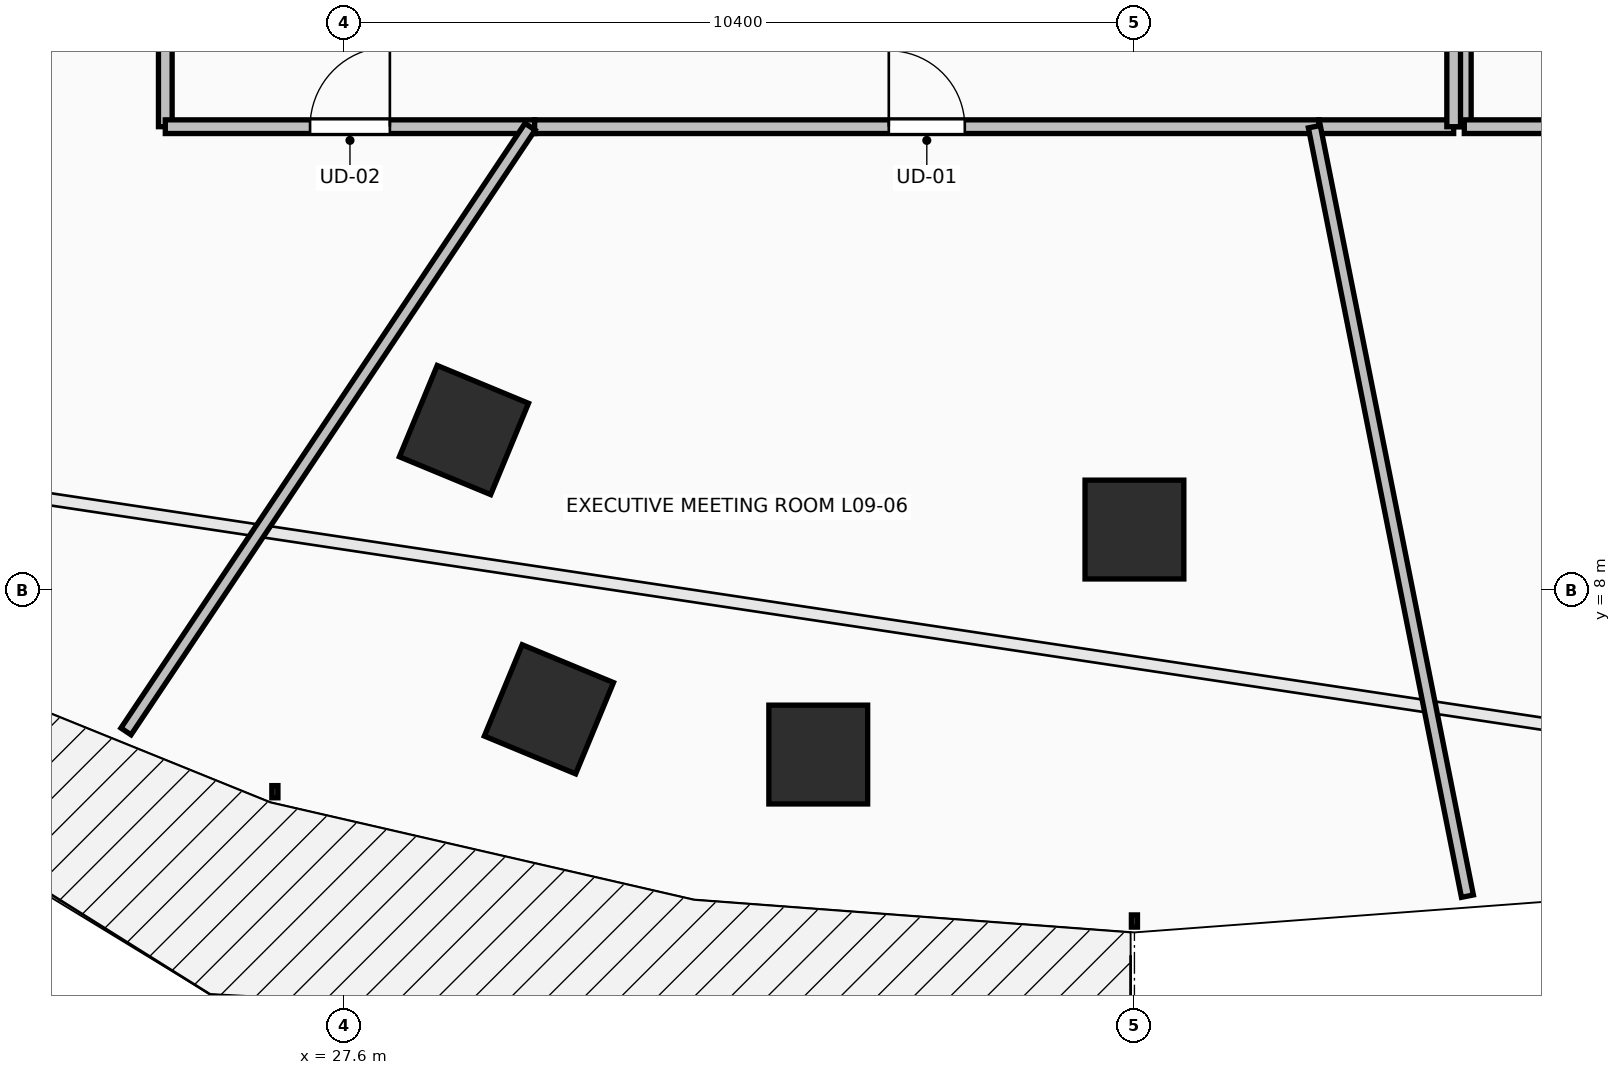
"""IFC4 building model, lengths in metres.
Left out: names, types, materials, properties, quantities, classifications, styles, units other than length and angle.
Written with IfcOpenShell. Run it as: python <this file> out.ifc"""

import sys

from ifc_helpers import new_model, si_unit, direction, frame, frame_2d, origin, origin_2d, place, context, subcontext, project, spatial, rectangle, extrude, element, fill, save


model = new_model("IFC4")
c1 = context("Model", 3, precision=1e-05, world=origin(), true_north=direction((0.0, 1.0)))
c2 = subcontext(c1, "Body", "Model", "MODEL_VIEW")
j1 = project(units=[si_unit("LENGTHUNIT", "METRE"), si_unit("PLANEANGLEUNIT", "RADIAN")], contexts=[c1])
p1 = place(None, origin())
s1 = spatial("IfcSite", under=j1, at=p1, CompositionType="ELEMENT")
p2 = place(p1, origin())
s2 = spatial("IfcBuilding", under=s1, at=p2, CompositionType="ELEMENT")
p3 = place(p2, frame((0.0, 0.0, 38.0)))
s3 = spatial("IfcBuildingStorey", under=s2, at=p3, CompositionType="ELEMENT", Elevation=38.0)
for number, where, z_axis, x_axis in (
    (1, (29.179, 10.109, 0.0), (0.0, 0.0, 1.0), (-0.383, -0.924, 0.0)),
    (2, (38.0, 8.8, 0.0), (0.0, 0.0, 1.0), (0.0, -1.0, 0.0)),
    (3, (30.297, 6.435, 0.0), (0.0, 0.0, 1.0), (-0.383, -0.924, 0.0)),
    (4, (33.84, 5.84, 0.0), (0.0, 0.0, 1.0), (0.0, -1.0, 0.0)),
):
    element("IfcColumn", number, at=place(p3, frame(where, z_axis=z_axis, x_axis=x_axis)), inside=s3, PredefinedType="COLUMN", context=c2, shape_type="SweptSolid", body=[
        extrude(rectangle(XDim=1.3, YDim=1.3, at=origin_2d()), origin(), (0.0, 0.0, 1.0), 3.5),
    ])
p4 = place(p3, frame((25.25, 18.384, 0.0), z_axis=(0.0, 0.0, 1.0), x_axis=(0.0, -1.0, 0.0)))
e5 = element("IfcWall", 5, at=p4, inside=s3, PredefinedType="PARTITIONING", context=c2, shape_type="SweptSolid", body=[
    extrude(rectangle(XDim=4.284, YDim=0.18, at=frame_2d((2.142, 0.0))), origin(), (0.0, 0.0, 1.0), 2.432),
])
p5 = place(p3, frame((25.25, 14.1, 0.0), z_axis=(0.0, 0.0, 1.0), x_axis=(1.0, 0.0, 0.0)))
e6 = element("IfcWall", 6, at=p5, inside=s3, PredefinedType="PARTITIONING", context=c2, shape_type="SweptSolid", body=[
    extrude(rectangle(XDim=4.859, YDim=0.18, at=frame_2d((2.429, 0.0))), origin(), (0.0, 0.0, 1.0), 2.432),
])
p6 = place(p5, frame((1.905, 0.0, 0.0)))
e7 = element("IfcOpeningElement", 7, at=p6, cuts=e6, PredefinedType="OPENING", context=c2, shape_type="SweptSolid", body=[
    extrude(rectangle(XDim=1.05, YDim=2.2, at=frame_2d((0.525, 1.1))), frame((0.0, 0.105, 0.0), z_axis=(0.0, -1.0, 0.0), x_axis=(1.0, 0.0, 0.0)), (0.0, 0.0, 1.0), 0.21),
])
p7 = place(p3, frame((30.109, 14.1, 0.0), z_axis=(0.0, 0.0, 1.0), x_axis=(1.0, 0.0, 0.0)))
e8 = element("IfcWall", 8, at=p7, inside=s3, PredefinedType="PARTITIONING", context=c2, shape_type="SweptSolid", body=[
    extrude(rectangle(XDim=10.319, YDim=0.18, at=frame_2d((5.16, 0.0))), origin(), (0.0, 0.0, 1.0), 3.24),
])
p8 = place(p7, frame((4.659, 0.0, 0.0)))
e9 = element("IfcOpeningElement", 9, at=p8, cuts=e8, PredefinedType="OPENING", context=c2, shape_type="SweptSolid", body=[
    extrude(rectangle(XDim=1.0, YDim=2.15, at=frame_2d((0.5, 1.075))), frame((0.0, 0.105, 0.0), z_axis=(0.0, -1.0, 0.0), x_axis=(1.0, 0.0, 0.0)), (0.0, 0.0, 1.0), 0.21),
])
p9 = place(p3, frame((42.34, 16.24, 0.0), z_axis=(0.0, 0.0, 1.0), x_axis=(0.0, -1.0, 0.0)))
e10 = element("IfcWall", 10, at=p9, inside=s3, PredefinedType="PARTITIONING", context=c2, shape_type="SweptSolid", body=[
    extrude(rectangle(XDim=2.14, YDim=0.18, at=frame_2d((1.07, 0.0))), origin(), (0.0, 0.0, 1.0), 3.24),
])
p10 = place(p3, frame((42.34, 14.1, 0.0), z_axis=(0.0, 0.0, 1.0), x_axis=(1.0, 0.0, 0.0)))
e11 = element("IfcWall", 11, at=p10, inside=s3, PredefinedType="PARTITIONING", context=c2, shape_type="SweptSolid", body=[
    extrude(rectangle(XDim=8.41, YDim=0.18, at=frame_2d((4.205, 0.0))), origin(), (0.0, 0.0, 1.0), 2.432),
])
p11 = place(p10, frame((3.705, 0.0, 0.0)))
e12 = element("IfcOpeningElement", 12, at=p11, cuts=e11, PredefinedType="OPENING", context=c2, shape_type="SweptSolid", body=[
    extrude(rectangle(XDim=1.0, YDim=2.15, at=frame_2d((0.5, 1.075))), frame((0.0, 0.105, 0.0), z_axis=(0.0, -1.0, 0.0), x_axis=(1.0, 0.0, 0.0)), (0.0, 0.0, 1.0), 0.21),
])
p12 = place(p3, frame((40.428, 14.1, 0.0), z_axis=(0.0, 0.0, 1.0), x_axis=(1.0, 0.0, 0.0)))
e13 = element("IfcWall", 13, at=p12, inside=s3, PredefinedType="PARTITIONING", context=c2, shape_type="SweptSolid", body=[
    extrude(rectangle(XDim=1.772, YDim=0.18, at=frame_2d((0.886, 0.0))), origin(), (0.0, 0.0, 1.0), 3.24),
])
p13 = place(p3, frame((42.2, 14.1, 0.0), z_axis=(0.0, 0.0, 1.0), x_axis=(0.0, 1.0, 0.0)))
e14 = element("IfcWall", 14, at=p13, inside=s3, PredefinedType="PARTITIONING", context=c2, shape_type="SweptSolid", body=[
    extrude(rectangle(XDim=2.14, YDim=0.18, at=frame_2d((1.07, 0.0))), origin(), (0.0, 0.0, 1.0), 3.24),
])
p14 = place(p3, frame((24.733, 6.144, 0.0), z_axis=(0.0, 0.0, 1.0), x_axis=(0.555577192504, 0.831464962082, 0.0)))
e15 = element("IfcWall", 15, at=p14, inside=s3, PredefinedType="PARTITIONING", context=c2, shape_type="SweptSolid", body=[
    extrude(rectangle(XDim=9.569, YDim=0.16, at=frame_2d((4.784, 0.0))), origin(), (0.0, 0.0, 1.0), 2.432),
])
p15 = place(p3, frame((42.381, 3.977, 0.0), z_axis=(0.0, 0.0, 1.0), x_axis=(-0.195142599893, 0.980774880239, 0.0)))
e16 = element("IfcWall", 16, at=p15, inside=s3, PredefinedType="PARTITIONING", context=c2, shape_type="SweptSolid", body=[
    extrude(rectangle(XDim=10.322, YDim=0.16, at=frame_2d((5.161, 0.0))), origin(), (0.0, 0.0, 1.0), 2.432),
])
p16 = place(p6, origin())
e17 = element("IfcDoor", 17, at=p16, inside=s3, OperationType="SINGLE_SWING_RIGHT", PredefinedType="DOOR", context=c2, shape_type="SweptSolid", body=[
    extrude(rectangle(XDim=1.05, YDim=2.2, at=frame_2d((0.525, 1.1))), frame((0.0, 0.025, 0.0), z_axis=(0.0, -1.0, 0.0), x_axis=(1.0, 0.0, 0.0)), (0.0, 0.0, 1.0), 0.05),
])
fill(e7, e17)
p17 = place(p8, origin())
e18 = element("IfcDoor", 18, at=p17, inside=s3, OperationType="SINGLE_SWING_LEFT", PredefinedType="DOOR", context=c2, shape_type="SweptSolid", body=[
    extrude(rectangle(XDim=1.0, YDim=2.15, at=frame_2d((0.5, 1.075))), frame((0.0, 0.025, 0.0), z_axis=(0.0, -1.0, 0.0), x_axis=(1.0, 0.0, 0.0)), (0.0, 0.0, 1.0), 0.05),
])
fill(e9, e18)
save(model, sys.argv[1])
